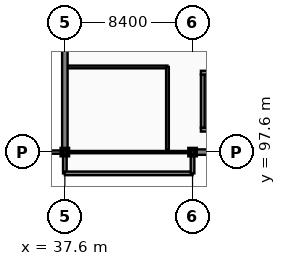
"""IFC4 building model, lengths in metres.
Left out: names, types, materials, properties, quantities, classifications, styles, units other than length and angle.
Written with IfcOpenShell. Run it as: python <this file> out.ifc"""

import sys

from ifc_helpers import new_model, si_unit, direction, frame, frame_2d, origin, origin_2d, place, context, subcontext, project, spatial, rectangle, extrude, element, fill, save


model = new_model("IFC4")
c1 = context("Model", 3, precision=1e-05, world=origin(), true_north=direction((0.0, 1.0)))
c2 = subcontext(c1, "Body", "Model", "MODEL_VIEW")
j1 = project(units=[si_unit("LENGTHUNIT", "METRE"), si_unit("PLANEANGLEUNIT", "RADIAN")], contexts=[c1])
p1 = place(None, origin())
s1 = spatial("IfcSite", under=j1, at=p1, CompositionType="ELEMENT")
p2 = place(p1, origin())
s2 = spatial("IfcBuilding", under=s1, at=p2, CompositionType="ELEMENT")
p3 = place(p2, frame((0.0, 0.0, 17.7)))
s3 = spatial("IfcBuildingStorey", under=s2, at=p3, CompositionType="ELEMENT", Elevation=17.7)
for number, where, z_axis, x_axis in (
    (1, (37.6, 97.6, 0.0), (0.0, 0.0, 1.0), (1.0, 0.0, 0.0)),
    (2, (46.0, 97.6, 0.0), (0.0, 0.0, 1.0), (1.0, 0.0, 0.0)),
):
    element("IfcColumn", number, at=place(p3, frame(where, z_axis=z_axis, x_axis=x_axis)), inside=s3, PredefinedType="COLUMN", context=c2, shape_type="SweptSolid", body=[
        extrude(rectangle(XDim=0.4, YDim=0.4, at=origin_2d()), origin(), (0.0, 0.0, 1.0), 3.9),
    ])
p4 = place(p3, frame((37.74, 103.2, 0.0), z_axis=(0.0, 0.0, 1.0), x_axis=(1.0, 0.0, 0.0)))
e3 = element("IfcWall", 3, at=p4, inside=s3, PredefinedType="PARTITIONING", context=c2, shape_type="SweptSolid", body=[
    extrude(rectangle(XDim=6.61, YDim=0.18, at=frame_2d((3.305, 0.0))), origin(), (0.0, 0.0, 1.0), 3.09),
])
p5 = place(p4, frame((2.805, 0.0, -0.01)))
e4 = element("IfcOpeningElement", 4, at=p5, cuts=e3, PredefinedType="OPENING", context=c2, shape_type="SweptSolid", body=[
    extrude(rectangle(XDim=1.0, YDim=2.16, at=frame_2d((0.5, 1.08))), frame((0.0, 0.1, 0.0), z_axis=(0.0, -1.0, 0.0), x_axis=(1.0, 0.0, 0.0)), (0.0, 0.0, 1.0), 0.2),
])
p6 = place(p3, frame((44.35, 97.74, 0.0), z_axis=(0.0, 0.0, 1.0), x_axis=(0.0, 1.0, 0.0)))
e5 = element("IfcWall", 5, at=p6, inside=s3, PredefinedType="PARTITIONING", context=c2, shape_type="SweptSolid", body=[
    extrude(rectangle(XDim=5.46, YDim=0.18, at=frame_2d((2.73, 0.0))), origin(), (0.0, 0.0, 1.0), 3.01),
])
p7 = place(p3, frame((37.6, 97.6, 0.0), z_axis=(0.0, 0.0, 1.0), x_axis=(1.0, 0.0, 0.0)))
e6 = element("IfcWall", 6, at=p7, inside=s3, PredefinedType="PARTITIONING", context=c2, shape_type="SweptSolid", body=[
    extrude(rectangle(XDim=8.4, YDim=0.15, at=frame_2d((4.2, 0.0))), origin(), (0.0, 0.0, 1.0), 3.01),
])
p8 = place(p7, frame((2.59, 0.0, -0.01)))
e7 = element("IfcOpeningElement", 7, at=p8, cuts=e6, PredefinedType="OPENING", context=c2, shape_type="SweptSolid", body=[
    extrude(rectangle(XDim=1.0, YDim=2.16, at=frame_2d((0.5, 1.08))), frame((0.0, 0.085, 0.0), z_axis=(0.0, -1.0, 0.0), x_axis=(1.0, 0.0, 0.0)), (0.0, 0.0, 1.0), 0.17),
])
p9 = place(p3, frame((46.0, 97.6, 0.0), z_axis=(0.0, 0.0, 1.0), x_axis=(1.0, 0.0, 0.0)))
e8 = element("IfcWall", 8, at=p9, inside=s3, PredefinedType="SOLIDWALL", context=c2, shape_type="SweptSolid", body=[
    extrude(rectangle(XDim=4.8, YDim=0.36, at=frame_2d((2.4, 0.0))), origin(), (0.0, 0.0, 1.0), 3.01),
])
p10 = place(p9, frame((0.46, 0.0, 0.75)))
e9 = element("IfcOpeningElement", 9, at=p10, cuts=e8, PredefinedType="OPENING", context=c2, shape_type="SweptSolid", body=[
    extrude(rectangle(XDim=1.55, YDim=2.12, at=frame_2d((0.775, 1.06))), frame((0.0, 0.19, 0.0), z_axis=(0.0, -1.0, 0.0), x_axis=(1.0, 0.0, 0.0)), (0.0, 0.0, 1.0), 0.38),
])
p11 = place(p9, frame((2.66, 0.0, 0.75)))
e10 = element("IfcOpeningElement", 10, at=p11, cuts=e8, PredefinedType="OPENING", context=c2, shape_type="SweptSolid", body=[
    extrude(rectangle(XDim=1.55, YDim=2.12, at=frame_2d((0.775, 1.06))), frame((0.0, 0.19, 0.0), z_axis=(0.0, -1.0, 0.0), x_axis=(1.0, 0.0, 0.0)), (0.0, 0.0, 1.0), 0.38),
])
p12 = place(p3, frame((37.6, 106.0, 0.0), z_axis=(0.0, 0.0, 1.0), x_axis=(0.0, -1.0, 0.0)))
e11 = element("IfcWall", 11, at=p12, inside=s3, PredefinedType="SOLIDWALL", context=c2, shape_type="SweptSolid", body=[
    extrude(rectangle(XDim=8.4, YDim=0.36, at=frame_2d((4.2, 0.0))), origin(), (0.0, 0.0, 1.0), 3.01),
])
p13 = place(p12, frame((0.46, 0.0, 0.75)))
e12 = element("IfcOpeningElement", 12, at=p13, cuts=e11, PredefinedType="OPENING", context=c2, shape_type="SweptSolid", body=[
    extrude(rectangle(XDim=1.55, YDim=2.12, at=frame_2d((0.775, 1.06))), frame((0.0, 0.19, 0.0), z_axis=(0.0, -1.0, 0.0), x_axis=(1.0, 0.0, 0.0)), (0.0, 0.0, 1.0), 0.38),
])
p14 = place(p12, frame((6.26, 0.0, 0.75)))
e13 = element("IfcOpeningElement", 13, at=p14, cuts=e11, PredefinedType="OPENING", context=c2, shape_type="SweptSolid", body=[
    extrude(rectangle(XDim=1.55, YDim=2.12, at=frame_2d((0.775, 1.06))), frame((0.0, 0.19, 0.0), z_axis=(0.0, -1.0, 0.0), x_axis=(1.0, 0.0, 0.0)), (0.0, 0.0, 1.0), 0.38),
])
p15 = place(p3, frame((37.6, 97.45, 0.0), z_axis=(0.0, 0.0, 1.0), x_axis=(0.0, -1.0, 0.0)))
e14 = element("IfcWall", 14, at=p15, inside=s3, PredefinedType="SOLIDWALL", context=c2, shape_type="SweptSolid", body=[
    extrude(rectangle(XDim=1.25, YDim=0.24, at=frame_2d((0.625, 0.0))), origin(), (0.0, 0.0, 1.0), 3.01),
])
p16 = place(p3, frame((37.6, 96.2, 0.0), z_axis=(0.0, 0.0, 1.0), x_axis=(1.0, 0.0, 0.0)))
e15 = element("IfcWall", 15, at=p16, inside=s3, PredefinedType="SOLIDWALL", context=c2, shape_type="SweptSolid", body=[
    extrude(rectangle(XDim=8.4, YDim=0.24, at=frame_2d((4.2, 0.0))), origin(), (0.0, 0.0, 1.0), 3.01),
])
p17 = place(p16, frame((0.46, 0.0, 0.65)))
e16 = element("IfcOpeningElement", 16, at=p17, cuts=e15, PredefinedType="OPENING", context=c2, shape_type="SweptSolid", body=[
    extrude(rectangle(XDim=2.4, YDim=2.1, at=frame_2d((1.2, 1.05))), frame((0.0, 0.13, 0.0), z_axis=(0.0, -1.0, 0.0), x_axis=(1.0, 0.0, 0.0)), (0.0, 0.0, 1.0), 0.26),
])
p18 = place(p16, frame((5.46, 0.0, 0.65)))
e17 = element("IfcOpeningElement", 17, at=p18, cuts=e15, PredefinedType="OPENING", context=c2, shape_type="SweptSolid", body=[
    extrude(rectangle(XDim=2.4, YDim=2.1, at=frame_2d((1.2, 1.05))), frame((0.0, 0.13, 0.0), z_axis=(0.0, -1.0, 0.0), x_axis=(1.0, 0.0, 0.0)), (0.0, 0.0, 1.0), 0.26),
])
p19 = place(p3, frame((46.0, 96.2, 0.0), z_axis=(0.0, 0.0, 1.0), x_axis=(0.0, 1.0, 0.0)))
e18 = element("IfcWall", 18, at=p19, inside=s3, PredefinedType="SOLIDWALL", context=c2, shape_type="SweptSolid", body=[
    extrude(rectangle(XDim=1.25, YDim=0.24, at=frame_2d((0.625, 0.0))), origin(), (0.0, 0.0, 1.0), 3.01),
])
p20 = place(p3, frame((29.2, 97.6, 0.0), z_axis=(0.0, 0.0, 1.0), x_axis=(1.0, 0.0, 0.0)))
e19 = element("IfcWall", 19, at=p20, inside=s3, PredefinedType="PARAPET", context=c2, shape_type="SweptSolid", body=[
    extrude(rectangle(XDim=8.4, YDim=0.22, at=frame_2d((4.2, 0.0))), origin(), (0.0, 0.0, 1.0), 1.15),
])
p21 = place(p3, frame((46.675, 102.7, 0.0), z_axis=(0.0, 0.0, 1.0), x_axis=(0.0, -1.0, 0.0)))
e20 = element("IfcWall", 20, at=p21, inside=s3, PredefinedType="SHEAR", context=c2, shape_type="SweptSolid", body=[
    extrude(rectangle(XDim=3.5, YDim=0.25, at=frame_2d((1.75, 0.0))), origin(), (0.0, 0.0, 1.0), 3.9),
])
p22 = place(p21, frame((1.1, 0.0, -0.01)))
e21 = element("IfcOpeningElement", 21, at=p22, cuts=e20, PredefinedType="OPENING", context=c2, shape_type="SweptSolid", body=[
    extrude(rectangle(XDim=1.3, YDim=2.16, at=frame_2d((0.65, 1.08))), frame((0.0, 0.135, 0.0), z_axis=(0.0, -1.0, 0.0), x_axis=(1.0, 0.0, 0.0)), (0.0, 0.0, 1.0), 0.27),
])
for number, where, z_axis, x_axis in (
    (22, (46.55, 99.075, 0.0), (0.0, 0.0, 1.0), (1.0, 0.0, 0.0)),
    (23, (46.55, 102.825, 0.0), (0.0, 0.0, 1.0), (1.0, 0.0, 0.0)),
):
    element("IfcWall", number, at=place(p3, frame(where, z_axis=z_axis, x_axis=x_axis)), inside=s3, PredefinedType="SHEAR", context=c2, shape_type="SweptSolid", body=[
        extrude(rectangle(XDim=8.9, YDim=0.25, at=frame_2d((4.45, 0.0))), origin(), (0.0, 0.0, 1.0), 3.9),
    ])
p23 = place(p5, frame((1.0, 0.0, 0.01), z_axis=(0.0, 0.0, 1.0), x_axis=(-1.0, 0.0, 0.0)))
e24 = element("IfcDoor", 24, at=p23, inside=s3, OperationType="SINGLE_SWING_LEFT", PredefinedType="DOOR", context=c2, shape_type="SweptSolid", body=[
    extrude(rectangle(XDim=1.0, YDim=2.15, at=frame_2d((0.5, 1.075))), frame((0.0, 0.025, 0.0), z_axis=(0.0, -1.0, 0.0), x_axis=(1.0, 0.0, 0.0)), (0.0, 0.0, 1.0), 0.05),
])
fill(e4, e24)
p24 = place(p8, frame((0.0, 0.0, 0.01)))
e25 = element("IfcDoor", 25, at=p24, inside=s3, OperationType="SINGLE_SWING_LEFT", PredefinedType="DOOR", context=c2, shape_type="SweptSolid", body=[
    extrude(rectangle(XDim=1.0, YDim=2.15, at=frame_2d((0.5, 1.075))), frame((0.0, 0.025, 0.0), z_axis=(0.0, -1.0, 0.0), x_axis=(1.0, 0.0, 0.0)), (0.0, 0.0, 1.0), 0.05),
])
fill(e7, e25)
p25 = place(p10, origin())
e26 = element("IfcWindow", 26, at=p25, inside=s3, PartitioningType="DOUBLE_PANEL_HORIZONTAL", PredefinedType="WINDOW", context=c2, shape_type="SweptSolid", body=[
    extrude(rectangle(XDim=1.55, YDim=2.12, at=frame_2d((0.775, 1.06))), frame((0.0, 0.03, 0.0), z_axis=(0.0, -1.0, 0.0), x_axis=(1.0, 0.0, 0.0)), (0.0, 0.0, 1.0), 0.06),
])
fill(e9, e26)
p26 = place(p13, origin())
e27 = element("IfcWindow", 27, at=p26, inside=s3, PartitioningType="DOUBLE_PANEL_HORIZONTAL", PredefinedType="WINDOW", context=c2, shape_type="SweptSolid", body=[
    extrude(rectangle(XDim=1.55, YDim=2.12, at=frame_2d((0.775, 1.06))), frame((0.0, 0.03, 0.0), z_axis=(0.0, -1.0, 0.0), x_axis=(1.0, 0.0, 0.0)), (0.0, 0.0, 1.0), 0.06),
])
fill(e12, e27)
p27 = place(p14, origin())
e28 = element("IfcWindow", 28, at=p27, inside=s3, PartitioningType="DOUBLE_PANEL_HORIZONTAL", PredefinedType="WINDOW", context=c2, shape_type="SweptSolid", body=[
    extrude(rectangle(XDim=1.55, YDim=2.12, at=frame_2d((0.775, 1.06))), frame((0.0, 0.03, 0.0), z_axis=(0.0, -1.0, 0.0), x_axis=(1.0, 0.0, 0.0)), (0.0, 0.0, 1.0), 0.06),
])
fill(e13, e28)
p28 = place(p17, origin())
e29 = element("IfcWindow", 29, at=p28, inside=s3, PartitioningType="TRIPLE_PANEL_VERTICAL", PredefinedType="WINDOW", context=c2, shape_type="SweptSolid", body=[
    extrude(rectangle(XDim=2.4, YDim=2.1, at=frame_2d((1.2, 1.05))), frame((0.0, 0.03, 0.0), z_axis=(0.0, -1.0, 0.0), x_axis=(1.0, 0.0, 0.0)), (0.0, 0.0, 1.0), 0.06),
])
fill(e16, e29)
p29 = place(p18, origin())
e30 = element("IfcWindow", 30, at=p29, inside=s3, PartitioningType="TRIPLE_PANEL_VERTICAL", PredefinedType="WINDOW", context=c2, shape_type="SweptSolid", body=[
    extrude(rectangle(XDim=2.4, YDim=2.1, at=frame_2d((1.2, 1.05))), frame((0.0, 0.03, 0.0), z_axis=(0.0, -1.0, 0.0), x_axis=(1.0, 0.0, 0.0)), (0.0, 0.0, 1.0), 0.06),
])
fill(e17, e30)
p30 = place(p22, frame((1.3, 0.0, 0.01), z_axis=(0.0, 0.0, 1.0), x_axis=(-1.0, 0.0, 0.0)))
e31 = element("IfcDoor", 31, at=p30, inside=s3, OperationType="SINGLE_SWING_LEFT", PredefinedType="DOOR", context=c2, shape_type="SweptSolid", body=[
    extrude(rectangle(XDim=1.3, YDim=2.15, at=frame_2d((0.65, 1.075))), frame((0.0, 0.025, 0.0), z_axis=(0.0, -1.0, 0.0), x_axis=(1.0, 0.0, 0.0)), (0.0, 0.0, 1.0), 0.05),
])
fill(e21, e31)
save(model, sys.argv[1])
